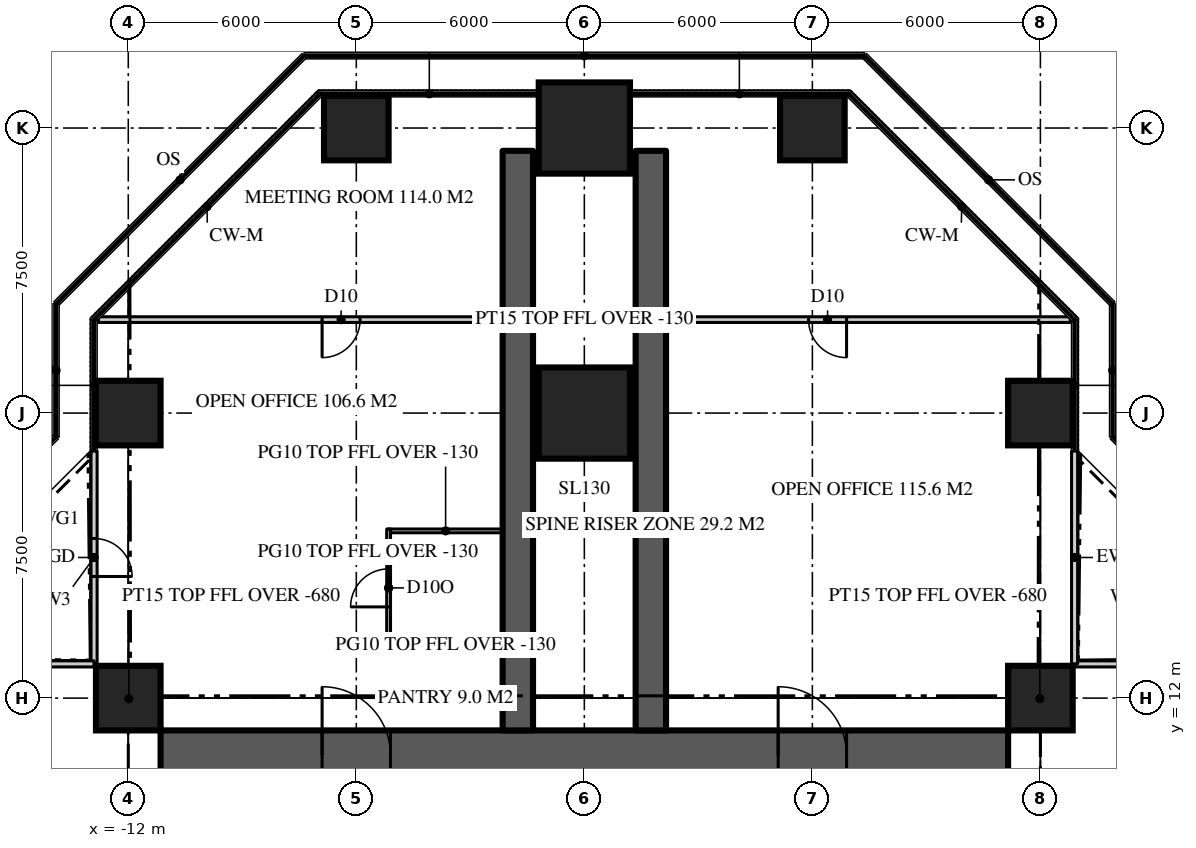
"""IFC4 building model, lengths in metres.
Left out: names, types, materials, properties, quantities, classifications, styles, units other than length and angle.
Written with IfcOpenShell. Run it as: python <this file> out.ifc"""

import sys

from ifc_helpers import new_model, si_unit, direction, frame, frame_2d, origin, origin_2d, place, context, subcontext, project, spatial, rectangle, extrude, element, fill, save


model = new_model("IFC4")
c1 = context("Model", 3, precision=1e-05, world=origin(), true_north=direction((0.0, 1.0)))
c2 = subcontext(c1, "Body", "Model", "MODEL_VIEW")
j1 = project(units=[si_unit("LENGTHUNIT", "METRE"), si_unit("PLANEANGLEUNIT", "RADIAN")], contexts=[c1])
p1 = place(None, origin())
s1 = spatial("IfcSite", under=j1, at=p1, CompositionType="ELEMENT")
p2 = place(p1, origin())
s2 = spatial("IfcBuilding", under=s1, at=p2, CompositionType="ELEMENT")
p3 = place(p2, frame((0.0, 0.0, 167.1)))
s3 = spatial("IfcBuildingStorey", under=s2, at=p3, CompositionType="ELEMENT", Elevation=167.1)
p4 = place(p3, frame((-11.15, 10.5, 0.0), z_axis=(0.0, 0.0, 1.0), x_axis=(1.0, 0.0, 0.0)))
e1 = element("IfcWall", 1, at=p4, inside=s3, PredefinedType="SHEAR", context=c2, shape_type="SweptSolid", body=[
    extrude(rectangle(XDim=22.3, YDim=1.3, at=frame_2d((11.15, 0.0))), origin(), (0.0, 0.0, 1.0), 3.9),
])
p5 = place(p4, frame((4.25, 0.0, 0.0)))
e2 = element("IfcOpeningElement", 2, at=p5, cuts=e1, PredefinedType="OPENING", context=c2, shape_type="SweptSolid", body=[
    extrude(rectangle(XDim=1.8, YDim=2.2, at=frame_2d((0.9, 1.1))), frame((0.0, 0.66, 0.0), z_axis=(0.0, -1.0, 0.0), x_axis=(1.0, 0.0, 0.0)), (0.0, 0.0, 1.0), 1.32),
])
p6 = place(p4, frame((16.25, 0.0, 0.0)))
e3 = element("IfcOpeningElement", 3, at=p6, cuts=e1, PredefinedType="OPENING", context=c2, shape_type="SweptSolid", body=[
    extrude(rectangle(XDim=1.8, YDim=2.2, at=frame_2d((0.9, 1.1))), frame((0.0, 0.66, 0.0), z_axis=(0.0, -1.0, 0.0), x_axis=(1.0, 0.0, 0.0)), (0.0, 0.0, 1.0), 1.32),
])
for number, where, z_axis, x_axis in (
    (4, (1.75, 11.15, 0.0), (0.0, 0.0, 1.0), (0.0, 1.0, 0.0)),
    (5, (-1.75, 11.15, 0.0), (0.0, 0.0, 1.0), (0.0, 1.0, 0.0)),
):
    element("IfcWall", number, at=place(p3, frame(where, z_axis=z_axis, x_axis=x_axis)), inside=s3, PredefinedType="SHEAR", context=c2, shape_type="SweptSolid", body=[
        extrude(rectangle(XDim=15.25, YDim=0.8, at=frame_2d((7.625, 0.0))), origin(), (0.0, 0.0, 1.0), 3.9),
    ])
for number, where, z_axis, x_axis in (
    (6, (-12.0, 12.0, 0.0), (0.0, 0.0, 1.0), (1.0, 0.0, 0.0)),
    (7, (12.0, 12.0, 0.0), (0.0, 0.0, 1.0), (1.0, 0.0, 0.0)),
    (8, (-12.0, 19.5, 0.0), (0.0, 0.0, 1.0), (1.0, 0.0, 0.0)),
):
    element("IfcColumn", number, at=place(p3, frame(where, z_axis=z_axis, x_axis=x_axis)), inside=s3, PredefinedType="COLUMN", context=c2, shape_type="SweptSolid", body=[
        extrude(rectangle(XDim=1.7, YDim=1.7, at=origin_2d()), origin(), (0.0, 0.0, 1.0), 3.9),
    ])
p7 = place(p3, frame((0.0, 19.5, 0.0), z_axis=(0.0, 0.0, 1.0), x_axis=(1.0, 0.0, 0.0)))
e9 = element("IfcColumn", 9, at=p7, inside=s3, PredefinedType="COLUMN", context=c2, shape_type="SweptSolid", body=[
    extrude(rectangle(XDim=2.4, YDim=2.4, at=origin_2d()), origin(), (0.0, 0.0, 1.0), 3.9),
])
for number, where, z_axis, x_axis in (
    (10, (12.0, 19.5, 0.0), (0.0, 0.0, 1.0), (1.0, 0.0, 0.0)),
    (11, (-6.0, 27.0, 0.0), (0.0, 0.0, 1.0), (1.0, 0.0, 0.0)),
):
    element("IfcColumn", number, at=place(p3, frame(where, z_axis=z_axis, x_axis=x_axis)), inside=s3, PredefinedType="COLUMN", context=c2, shape_type="SweptSolid", body=[
        extrude(rectangle(XDim=1.7, YDim=1.7, at=origin_2d()), origin(), (0.0, 0.0, 1.0), 3.9),
    ])
p8 = place(p3, frame((0.0, 27.0, 0.0), z_axis=(0.0, 0.0, 1.0), x_axis=(1.0, 0.0, 0.0)))
e12 = element("IfcColumn", 12, at=p8, inside=s3, PredefinedType="COLUMN", context=c2, shape_type="SweptSolid", body=[
    extrude(rectangle(XDim=2.4, YDim=2.4, at=origin_2d()), origin(), (0.0, 0.0, 1.0), 3.9),
])
p9 = place(p3, frame((6.0, 27.0, 0.0), z_axis=(0.0, 0.0, 1.0), x_axis=(1.0, 0.0, 0.0)))
e13 = element("IfcColumn", 13, at=p9, inside=s3, PredefinedType="COLUMN", context=c2, shape_type="SweptSolid", body=[
    extrude(rectangle(XDim=1.7, YDim=1.7, at=origin_2d()), origin(), (0.0, 0.0, 1.0), 3.9),
])
p10 = place(p3, frame((18.5, 12.9, 0.0), z_axis=(0.0, 0.0, 1.0), x_axis=(-1.0, 0.0, 0.0)))
e14 = element("IfcWall", 14, at=p10, inside=s3, PredefinedType="SOLIDWALL", context=c2, shape_type="SweptSolid", body=[
    extrude(rectangle(XDim=5.6, YDim=0.16, at=frame_2d((2.8, 0.0))), origin(), (0.0, 0.0, 1.0), 3.77),
])
p11 = place(p10, frame((2.3, 0.0, 0.0)))
e15 = element("IfcOpeningElement", 15, at=p11, cuts=e14, PredefinedType="OPENING", context=c2, shape_type="SweptSolid", body=[
    extrude(rectangle(XDim=1.0, YDim=2.2, at=frame_2d((0.5, 1.1))), frame((0.0, 0.09, 0.0), z_axis=(0.0, -1.0, 0.0), x_axis=(1.0, 0.0, 0.0)), (0.0, 0.0, 1.0), 0.18),
])
p12 = place(p3, frame((12.9, 12.9, 0.0), z_axis=(0.0, 0.0, 1.0), x_axis=(0.0, 1.0, 0.0)))
e16 = element("IfcWall", 16, at=p12, inside=s3, PredefinedType="SOLIDWALL", context=c2, shape_type="SweptSolid", body=[
    extrude(rectangle(XDim=5.6, YDim=0.16, at=frame_2d((2.8, 0.0))), origin(), (0.0, 0.0, 1.0), 3.77),
])
p13 = place(p3, frame((-12.9, 18.5, 0.0), z_axis=(0.0, 0.0, 1.0), x_axis=(0.0, -1.0, 0.0)))
e17 = element("IfcWall", 17, at=p13, inside=s3, PredefinedType="SOLIDWALL", context=c2, shape_type="SweptSolid", body=[
    extrude(rectangle(XDim=5.6, YDim=0.16, at=frame_2d((2.8, 0.0))), origin(), (0.0, 0.0, 1.0), 3.77),
])
p14 = place(p13, frame((2.3, 0.0, 0.0)))
e18 = element("IfcOpeningElement", 18, at=p14, cuts=e17, PredefinedType="OPENING", context=c2, shape_type="SweptSolid", body=[
    extrude(rectangle(XDim=1.0, YDim=2.2, at=frame_2d((0.5, 1.1))), frame((0.0, 0.09, 0.0), z_axis=(0.0, -1.0, 0.0), x_axis=(1.0, 0.0, 0.0)), (0.0, 0.0, 1.0), 0.18),
])
p15 = place(p3, frame((-12.9, 12.9, 0.0), z_axis=(0.0, 0.0, 1.0), x_axis=(-1.0, 0.0, 0.0)))
e19 = element("IfcWall", 19, at=p15, inside=s3, PredefinedType="SOLIDWALL", context=c2, shape_type="SweptSolid", body=[
    extrude(rectangle(XDim=5.6, YDim=0.16, at=frame_2d((2.8, 0.0))), origin(), (0.0, 0.0, 1.0), 3.77),
])
p16 = place(p3, frame((12.786, 21.959, 0.0), z_axis=(0.0, 0.0, 1.0), x_axis=(-1.0, 0.0, 0.0)))
e20 = element("IfcWall", 20, at=p16, inside=s3, PredefinedType="PARTITIONING", context=c2, shape_type="SweptSolid", body=[
    extrude(rectangle(XDim=25.573, YDim=0.15, at=frame_2d((12.786, 0.0))), origin(), (0.0, 0.0, 1.0), 3.77),
])
p17 = place(p16, frame((18.687, 0.0, 0.0)))
e21 = element("IfcOpeningElement", 21, at=p17, cuts=e20, PredefinedType="OPENING", context=c2, shape_type="SweptSolid", body=[
    extrude(rectangle(XDim=1.0, YDim=2.2, at=frame_2d((0.5, 1.1))), frame((0.0, 0.085, 0.0), z_axis=(0.0, -1.0, 0.0), x_axis=(1.0, 0.0, 0.0)), (0.0, 0.0, 1.0), 0.17),
])
p18 = place(p16, frame((5.886, 0.0, 0.0)))
e22 = element("IfcOpeningElement", 22, at=p18, cuts=e20, PredefinedType="OPENING", context=c2, shape_type="SweptSolid", body=[
    extrude(rectangle(XDim=1.0, YDim=2.2, at=frame_2d((0.5, 1.1))), frame((0.0, 0.085, 0.0), z_axis=(0.0, -1.0, 0.0), x_axis=(1.0, 0.0, 0.0)), (0.0, 0.0, 1.0), 0.17),
])
for number, where, z_axis, x_axis in (
    (23, (-2.15, 13.4, 0.0), (0.0, 0.0, 1.0), (-1.0, 0.0, 0.0)),
    (24, (-2.15, 16.4, 0.0), (0.0, 0.0, 1.0), (-1.0, 0.0, 0.0)),
):
    element("IfcWall", number, at=place(p3, frame(where, z_axis=z_axis, x_axis=x_axis)), inside=s3, PredefinedType="PARTITIONING", context=c2, shape_type="SweptSolid", body=[
        extrude(rectangle(XDim=3.0, YDim=0.1, at=frame_2d((1.5, 0.0))), origin(), (0.0, 0.0, 1.0), 3.77),
    ])
p19 = place(p3, frame((-5.15, 13.35, 0.0), z_axis=(0.0, 0.0, 1.0), x_axis=(0.0, 1.0, 0.0)))
e25 = element("IfcWall", 25, at=p19, inside=s3, PredefinedType="PARTITIONING", context=c2, shape_type="SweptSolid", body=[
    extrude(rectangle(XDim=3.1, YDim=0.1, at=frame_2d((1.55, 0.0))), origin(), (0.0, 0.0, 1.0), 3.77),
])
p20 = place(p19, frame((1.05, 0.0, 0.0)))
e26 = element("IfcOpeningElement", 26, at=p20, cuts=e25, PredefinedType="OPENING", context=c2, shape_type="SweptSolid", body=[
    extrude(rectangle(XDim=1.0, YDim=2.2, at=frame_2d((0.5, 1.1))), frame((0.0, 0.06, 0.0), z_axis=(0.0, -1.0, 0.0), x_axis=(1.0, 0.0, 0.0)), (0.0, 0.0, 1.0), 0.12),
])
for number, where, z_axis, x_axis in (
    (27, (11.15, 11.15, 0.0), (0.0, 0.0, 1.0), (0.707, 0.707, 0.0)),
    (28, (-11.15, 11.15, 0.0), (0.0, 0.0, 1.0), (-0.707, 0.707, 0.0)),
):
    element("IfcWall", number, at=place(p3, frame(where, z_axis=z_axis, x_axis=x_axis)), inside=s3, PredefinedType="PARTITIONING", context=c2, shape_type="SweptSolid", body=[
        extrude(rectangle(XDim=2.362, YDim=0.15, at=frame_2d((1.181, 0.0))), origin(), (0.0, 0.0, 1.0), 3.22),
    ])
p21 = place(p14, origin())
e29 = element("IfcDoor", 29, at=p21, inside=s3, OperationType="SINGLE_SWING_RIGHT", PredefinedType="DOOR", context=c2, shape_type="SweptSolid", body=[
    extrude(rectangle(XDim=1.0, YDim=2.2, at=frame_2d((0.5, 1.1))), frame((0.0, 0.025, 0.0), z_axis=(0.0, -1.0, 0.0), x_axis=(1.0, 0.0, 0.0)), (0.0, 0.0, 1.0), 0.05),
])
fill(e18, e29)
p22 = place(p5, origin())
e30 = element("IfcDoor", 30, at=p22, inside=s3, OperationType="DOUBLE_DOOR_DOUBLE_SWING", PredefinedType="DOOR", context=c2, shape_type="SweptSolid", body=[
    extrude(rectangle(XDim=1.8, YDim=2.2, at=frame_2d((0.9, 1.1))), frame((0.0, 0.025, 0.0), z_axis=(0.0, -1.0, 0.0), x_axis=(1.0, 0.0, 0.0)), (0.0, 0.0, 1.0), 0.05),
])
fill(e2, e30)
p23 = place(p6, origin())
e31 = element("IfcDoor", 31, at=p23, inside=s3, OperationType="DOUBLE_DOOR_DOUBLE_SWING", PredefinedType="DOOR", context=c2, shape_type="SweptSolid", body=[
    extrude(rectangle(XDim=1.8, YDim=2.2, at=frame_2d((0.9, 1.1))), frame((0.0, 0.025, 0.0), z_axis=(0.0, -1.0, 0.0), x_axis=(1.0, 0.0, 0.0)), (0.0, 0.0, 1.0), 0.05),
])
fill(e3, e31)
p24 = place(p17, origin())
e32 = element("IfcDoor", 32, at=p24, inside=s3, OperationType="SINGLE_SWING_RIGHT", PredefinedType="DOOR", context=c2, shape_type="SweptSolid", body=[
    extrude(rectangle(XDim=1.0, YDim=2.2, at=frame_2d((0.5, 1.1))), frame((0.0, 0.025, 0.0), z_axis=(0.0, -1.0, 0.0), x_axis=(1.0, 0.0, 0.0)), (0.0, 0.0, 1.0), 0.05),
])
fill(e21, e32)
p25 = place(p18, origin())
e33 = element("IfcDoor", 33, at=p25, inside=s3, OperationType="SINGLE_SWING_LEFT", PredefinedType="DOOR", context=c2, shape_type="SweptSolid", body=[
    extrude(rectangle(XDim=1.0, YDim=2.2, at=frame_2d((0.5, 1.1))), frame((0.0, 0.025, 0.0), z_axis=(0.0, -1.0, 0.0), x_axis=(1.0, 0.0, 0.0)), (0.0, 0.0, 1.0), 0.05),
])
fill(e22, e33)
p26 = place(p20, origin())
e34 = element("IfcDoor", 34, at=p26, inside=s3, OperationType="SINGLE_SWING_LEFT", PredefinedType="DOOR", context=c2, shape_type="SweptSolid", body=[
    extrude(rectangle(XDim=1.0, YDim=2.2, at=frame_2d((0.5, 1.1))), frame((0.0, 0.025, 0.0), z_axis=(0.0, -1.0, 0.0), x_axis=(1.0, 0.0, 0.0)), (0.0, 0.0, 1.0), 0.05),
])
fill(e26, e34)
save(model, sys.argv[1])
